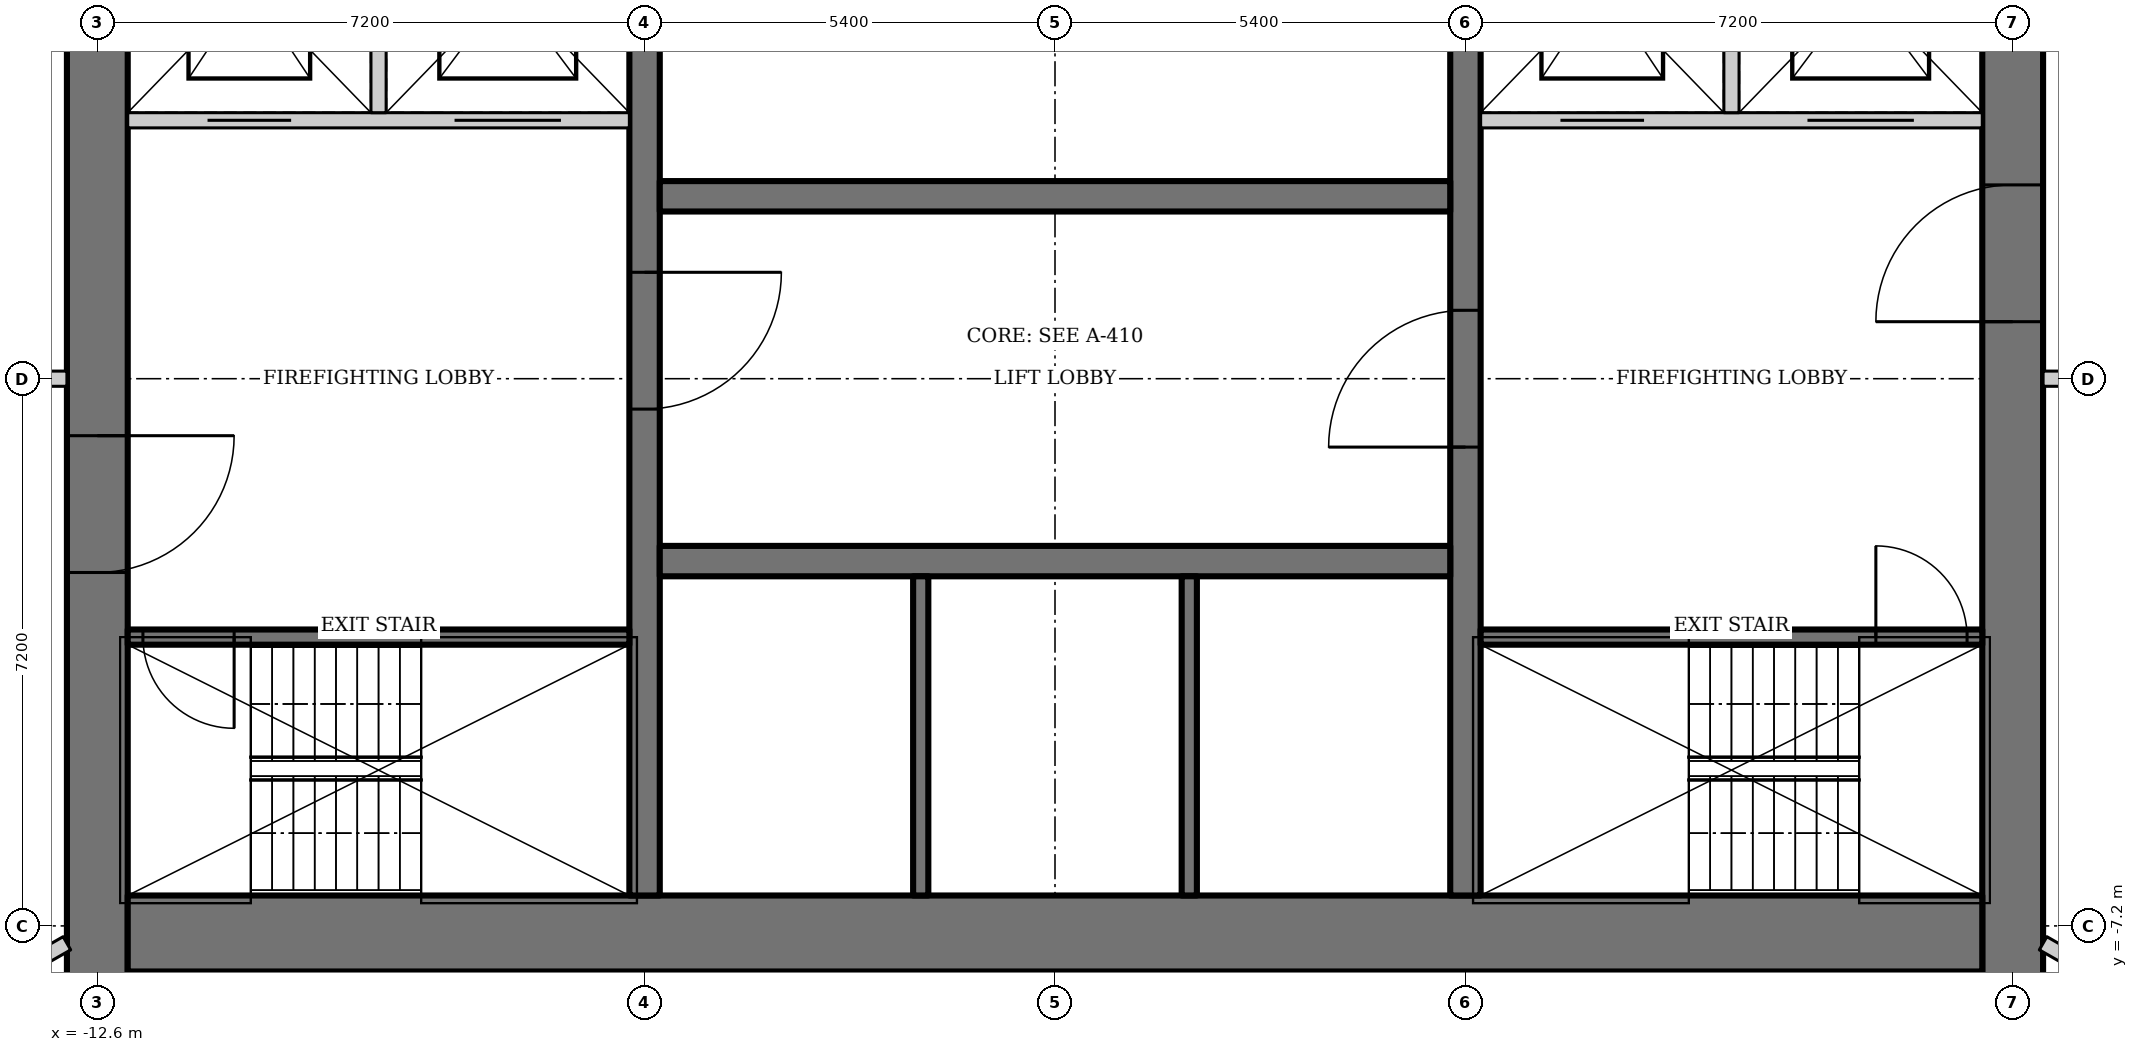
"""IFC4 building model, lengths in metres.
Left out: names, types, materials, properties, quantities, classifications, styles, units other than length and angle.
Written with IfcOpenShell. Run it as: python <this file> out.ifc"""

import sys

from ifc_helpers import new_model, si_unit, direction, frame, frame_2d, origin, place, context, subcontext, project, spatial, rectangle, extrude, element, fill, save


model = new_model("IFC4")
c1 = context("Model", 3, precision=1e-05, world=origin(), true_north=direction((0.0, 1.0)))
c2 = subcontext(c1, "Body", "Model", "MODEL_VIEW")
j1 = project(units=[si_unit("LENGTHUNIT", "METRE"), si_unit("PLANEANGLEUNIT", "RADIAN")], contexts=[c1])
p1 = place(None, origin())
s1 = spatial("IfcSite", under=j1, at=p1, CompositionType="ELEMENT")
p2 = place(p1, origin())
s2 = spatial("IfcBuilding", under=s1, at=p2, CompositionType="ELEMENT")
p3 = place(p2, frame((0.0, 0.0, 284.4)))
s3 = spatial("IfcBuildingStorey", under=s2, at=p3, CompositionType="ELEMENT", Elevation=284.4)
p4 = place(p3, frame((12.6, -11.0, 0.0), z_axis=(0.0, 0.0, 1.0), x_axis=(0.0, 1.0, 0.0)))
e1 = element("IfcWall", 1, at=p4, inside=s3, PredefinedType="SHEAR", context=c2, shape_type="SweptSolid", body=[
    extrude(rectangle(XDim=22.0, YDim=0.8, at=frame_2d((11.0, 0.0))), origin(), (0.0, 0.0, 1.0), 6.0),
])
p5 = place(p4, frame((11.75, 0.0, 0.0)))
e2 = element("IfcOpeningElement", 2, at=p5, cuts=e1, PredefinedType="OPENING", context=c2, shape_type="SweptSolid", body=[
    extrude(rectangle(XDim=1.8, YDim=2.1, at=frame_2d((0.9, 1.05))), frame((0.0, 0.41, 0.0), z_axis=(0.0, -1.0, 0.0), x_axis=(1.0, 0.0, 0.0)), (0.0, 0.0, 1.0), 0.82),
])
p6 = place(p3, frame((-12.6, 11.0, 0.0), z_axis=(0.0, 0.0, 1.0), x_axis=(0.0, -1.0, 0.0)))
e3 = element("IfcWall", 3, at=p6, inside=s3, PredefinedType="SHEAR", context=c2, shape_type="SweptSolid", body=[
    extrude(rectangle(XDim=22.0, YDim=0.8, at=frame_2d((11.0, 0.0))), origin(), (0.0, 0.0, 1.0), 6.0),
])
p7 = place(p6, frame((11.75, 0.0, 0.0)))
e4 = element("IfcOpeningElement", 4, at=p7, cuts=e3, PredefinedType="OPENING", context=c2, shape_type="SweptSolid", body=[
    extrude(rectangle(XDim=1.8, YDim=2.1, at=frame_2d((0.9, 1.05))), frame((0.0, 0.41, 0.0), z_axis=(0.0, -1.0, 0.0), x_axis=(1.0, 0.0, 0.0)), (0.0, 0.0, 1.0), 0.82),
])
p8 = place(p3, frame((-12.2, -7.3, 0.0), z_axis=(0.0, 0.0, 1.0), x_axis=(1.0, 0.0, 0.0)))
e5 = element("IfcWall", 5, at=p8, inside=s3, PredefinedType="SHEAR", context=c2, shape_type="SweptSolid", body=[
    extrude(rectangle(XDim=24.4, YDim=1.0, at=frame_2d((12.2, 0.0))), origin(), (0.0, 0.0, 1.0), 6.0),
])
p9 = place(p3, frame((5.4, -6.8, 0.0), z_axis=(0.0, 0.0, 1.0), x_axis=(0.0, 1.0, 0.0)))
e6 = element("IfcWall", 6, at=p9, inside=s3, PredefinedType="SHEAR", context=c2, shape_type="SweptSolid", body=[
    extrude(rectangle(XDim=14.6, YDim=0.4, at=frame_2d((7.3, 0.0))), origin(), (0.0, 0.0, 1.0), 6.0),
])
p10 = place(p9, frame((5.9, 0.0, 0.0)))
e7 = element("IfcOpeningElement", 7, at=p10, cuts=e6, PredefinedType="OPENING", context=c2, shape_type="SweptSolid", body=[
    extrude(rectangle(XDim=1.8, YDim=2.1, at=frame_2d((0.9, 1.05))), frame((0.0, 0.21, 0.0), z_axis=(0.0, -1.0, 0.0), x_axis=(1.0, 0.0, 0.0)), (0.0, 0.0, 1.0), 0.42),
])
p11 = place(p3, frame((-5.4, 7.8, 0.0), z_axis=(0.0, 0.0, 1.0), x_axis=(0.0, -1.0, 0.0)))
e8 = element("IfcWall", 8, at=p11, inside=s3, PredefinedType="SHEAR", context=c2, shape_type="SweptSolid", body=[
    extrude(rectangle(XDim=14.6, YDim=0.4, at=frame_2d((7.3, 0.0))), origin(), (0.0, 0.0, 1.0), 6.0),
])
p12 = place(p11, frame((6.4, 0.0, 0.0)))
e9 = element("IfcOpeningElement", 9, at=p12, cuts=e8, PredefinedType="OPENING", context=c2, shape_type="SweptSolid", body=[
    extrude(rectangle(XDim=1.8, YDim=2.1, at=frame_2d((0.9, 1.05))), frame((0.0, 0.21, 0.0), z_axis=(0.0, -1.0, 0.0), x_axis=(1.0, 0.0, 0.0)), (0.0, 0.0, 1.0), 0.42),
])
p13 = place(p3, frame((-5.2, -2.4, 0.0), z_axis=(0.0, 0.0, 1.0), x_axis=(1.0, 0.0, 0.0)))
e10 = element("IfcWall", 10, at=p13, inside=s3, PredefinedType="SHEAR", context=c2, shape_type="SweptSolid", body=[
    extrude(rectangle(XDim=10.4, YDim=0.4, at=frame_2d((5.2, 0.0))), origin(), (0.0, 0.0, 1.0), 6.0),
])
for number, where, z_axis, x_axis in (
    (11, (-1.767, -2.6, 0.0), (0.0, 0.0, 1.0), (0.0, -1.0, 0.0)),
    (12, (1.767, -2.6, 0.0), (0.0, 0.0, 1.0), (0.0, -1.0, 0.0)),
):
    element("IfcWall", number, at=place(p3, frame(where, z_axis=z_axis, x_axis=x_axis)), inside=s3, PredefinedType="SOLIDWALL", context=c2, shape_type="SweptSolid", body=[
        extrude(rectangle(XDim=4.2, YDim=0.2, at=frame_2d((2.1, 0.0))), origin(), (0.0, 0.0, 1.0), 6.0),
    ])
p14 = place(p3, frame((5.2, 2.4, 0.0), z_axis=(0.0, 0.0, 1.0), x_axis=(-1.0, 0.0, 0.0)))
e13 = element("IfcWall", 13, at=p14, inside=s3, PredefinedType="SHEAR", context=c2, shape_type="SweptSolid", body=[
    extrude(rectangle(XDim=10.4, YDim=0.4, at=frame_2d((5.2, 0.0))), origin(), (0.0, 0.0, 1.0), 6.0),
])
p15 = place(p3, frame((5.6, -3.4, 0.0), z_axis=(0.0, 0.0, 1.0), x_axis=(1.0, 0.0, 0.0)))
e14 = element("IfcWall", 14, at=p15, inside=s3, PredefinedType="SHEAR", context=c2, shape_type="SweptSolid", body=[
    extrude(rectangle(XDim=6.6, YDim=0.2, at=frame_2d((3.3, 0.0))), origin(), (0.0, 0.0, 1.0), 6.0),
])
p16 = place(p15, frame((5.2, 0.0, 0.0)))
e15 = element("IfcOpeningElement", 15, at=p16, cuts=e14, PredefinedType="OPENING", context=c2, shape_type="SweptSolid", body=[
    extrude(rectangle(XDim=1.2, YDim=2.1, at=frame_2d((0.6, 1.05))), frame((0.0, 0.11, 0.0), z_axis=(0.0, -1.0, 0.0), x_axis=(1.0, 0.0, 0.0)), (0.0, 0.0, 1.0), 0.22),
])
p17 = place(p3, frame((12.2, 3.4, 0.0), z_axis=(0.0, 0.0, 1.0), x_axis=(-1.0, 0.0, 0.0)))
e16 = element("IfcWall", 16, at=p17, inside=s3, PredefinedType="SOLIDWALL", context=c2, shape_type="SweptSolid", body=[
    extrude(rectangle(XDim=6.6, YDim=0.2, at=frame_2d((3.3, 0.0))), origin(), (0.0, 0.0, 1.0), 6.0),
])
p18 = place(p17, frame((4.45, 0.0, 0.0)))
e17 = element("IfcOpeningElement", 17, at=p18, cuts=e16, PredefinedType="OPENING", context=c2, shape_type="SweptSolid", body=[
    extrude(rectangle(XDim=1.1, YDim=2.2, at=frame_2d((0.55, 1.1))), frame((0.0, 0.11, 0.0), z_axis=(0.0, -1.0, 0.0), x_axis=(1.0, 0.0, 0.0)), (0.0, 0.0, 1.0), 0.22),
])
p19 = place(p17, frame((0.9, 0.0, 0.0)))
e18 = element("IfcOpeningElement", 18, at=p19, cuts=e16, PredefinedType="OPENING", context=c2, shape_type="SweptSolid", body=[
    extrude(rectangle(XDim=1.4, YDim=2.2, at=frame_2d((0.7, 1.1))), frame((0.0, 0.11, 0.0), z_axis=(0.0, -1.0, 0.0), x_axis=(1.0, 0.0, 0.0)), (0.0, 0.0, 1.0), 0.22),
])
p20 = place(p3, frame((8.9, 3.5, 0.0), z_axis=(0.0, 0.0, 1.0), x_axis=(0.0, 1.0, 0.0)))
e19 = element("IfcWall", 19, at=p20, inside=s3, PredefinedType="SOLIDWALL", context=c2, shape_type="SweptSolid", body=[
    extrude(rectangle(XDim=3.3, YDim=0.2, at=frame_2d((1.65, 0.0))), origin(), (0.0, 0.0, 1.0), 6.0),
])
p21 = place(p3, frame((-5.6, -3.4, 0.0), z_axis=(0.0, 0.0, 1.0), x_axis=(-1.0, 0.0, 0.0)))
e20 = element("IfcWall", 20, at=p21, inside=s3, PredefinedType="SHEAR", context=c2, shape_type="SweptSolid", body=[
    extrude(rectangle(XDim=6.6, YDim=0.2, at=frame_2d((3.3, 0.0))), origin(), (0.0, 0.0, 1.0), 6.0),
])
p22 = place(p21, frame((5.2, 0.0, 0.0)))
e21 = element("IfcOpeningElement", 21, at=p22, cuts=e20, PredefinedType="OPENING", context=c2, shape_type="SweptSolid", body=[
    extrude(rectangle(XDim=1.2, YDim=2.1, at=frame_2d((0.6, 1.05))), frame((0.0, 0.11, 0.0), z_axis=(0.0, -1.0, 0.0), x_axis=(1.0, 0.0, 0.0)), (0.0, 0.0, 1.0), 0.22),
])
p23 = place(p3, frame((-12.2, 3.4, 0.0), z_axis=(0.0, 0.0, 1.0), x_axis=(1.0, 0.0, 0.0)))
e22 = element("IfcWall", 22, at=p23, inside=s3, PredefinedType="SOLIDWALL", context=c2, shape_type="SweptSolid", body=[
    extrude(rectangle(XDim=6.6, YDim=0.2, at=frame_2d((3.3, 0.0))), origin(), (0.0, 0.0, 1.0), 6.0),
])
p24 = place(p23, frame((1.05, 0.0, 0.0)))
e23 = element("IfcOpeningElement", 23, at=p24, cuts=e22, PredefinedType="OPENING", context=c2, shape_type="SweptSolid", body=[
    extrude(rectangle(XDim=1.1, YDim=2.2, at=frame_2d((0.55, 1.1))), frame((0.0, 0.11, 0.0), z_axis=(0.0, -1.0, 0.0), x_axis=(1.0, 0.0, 0.0)), (0.0, 0.0, 1.0), 0.22),
])
p25 = place(p23, frame((4.3, 0.0, 0.0)))
e24 = element("IfcOpeningElement", 24, at=p25, cuts=e22, PredefinedType="OPENING", context=c2, shape_type="SweptSolid", body=[
    extrude(rectangle(XDim=1.4, YDim=2.2, at=frame_2d((0.7, 1.1))), frame((0.0, 0.11, 0.0), z_axis=(0.0, -1.0, 0.0), x_axis=(1.0, 0.0, 0.0)), (0.0, 0.0, 1.0), 0.22),
])
p26 = place(p3, frame((-8.9, 3.5, 0.0), z_axis=(0.0, 0.0, 1.0), x_axis=(0.0, 1.0, 0.0)))
e25 = element("IfcWall", 25, at=p26, inside=s3, PredefinedType="SOLIDWALL", context=c2, shape_type="SweptSolid", body=[
    extrude(rectangle(XDim=3.3, YDim=0.2, at=frame_2d((1.65, 0.0))), origin(), (0.0, 0.0, 1.0), 6.0),
])
for number, where, z_axis, x_axis in (
    (26, (13.0, 0.0, 0.0), (0.0, 0.0, 1.0), (1.0, 0.0, 0.0)),
    (27, (-13.0, 0.0, 0.0), (0.0, 0.0, 1.0), (-1.0, 0.0, 0.0)),
):
    element("IfcWall", number, at=place(p3, frame(where, z_axis=z_axis, x_axis=x_axis)), inside=s3, PredefinedType="SOLIDWALL", context=c2, shape_type="SweptSolid", body=[
        extrude(rectangle(XDim=4.5, YDim=0.2, at=frame_2d((2.25, 0.0))), origin(), (0.0, 0.0, 1.0), 4.6),
    ])
for number, where, z_axis, x_axis in (
    (28, (-13.0, -7.428, 0.0), (0.0, 0.0, 1.0), (-0.868, -0.496, 0.0)),
    (29, (13.0, -7.428, 0.0), (0.0, 0.0, 1.0), (0.868, -0.496, 0.0)),
):
    element("IfcWall", number, at=place(p3, frame(where, z_axis=z_axis, x_axis=x_axis)), inside=s3, PredefinedType="SOLIDWALL", context=c2, shape_type="SweptSolid", body=[
        extrude(rectangle(XDim=3.167, YDim=0.2, at=frame_2d((1.584, 0.0))), origin(), (0.0, 0.0, 1.0), 4.6),
    ])
p27 = place(p10, origin())
e30 = element("IfcDoor", 30, at=p27, inside=s3, OperationType="DOUBLE_DOOR_DOUBLE_SWING", PredefinedType="DOOR", context=c2, shape_type="SweptSolid", body=[
    extrude(rectangle(XDim=1.8, YDim=2.1, at=frame_2d((0.9, 1.05))), frame((0.0, 0.025, 0.0), z_axis=(0.0, -1.0, 0.0), x_axis=(1.0, 0.0, 0.0)), (0.0, 0.0, 1.0), 0.05),
])
fill(e7, e30)
p28 = place(p12, origin())
e31 = element("IfcDoor", 31, at=p28, inside=s3, OperationType="DOUBLE_DOOR_DOUBLE_SWING", PredefinedType="DOOR", context=c2, shape_type="SweptSolid", body=[
    extrude(rectangle(XDim=1.8, YDim=2.1, at=frame_2d((0.9, 1.05))), frame((0.0, 0.025, 0.0), z_axis=(0.0, -1.0, 0.0), x_axis=(1.0, 0.0, 0.0)), (0.0, 0.0, 1.0), 0.05),
])
fill(e9, e31)
p29 = place(p16, origin())
e32 = element("IfcDoor", 32, at=p29, inside=s3, OperationType="SINGLE_SWING_RIGHT", PredefinedType="DOOR", context=c2, shape_type="SweptSolid", body=[
    extrude(rectangle(XDim=1.2, YDim=2.1, at=frame_2d((0.6, 1.05))), frame((0.0, 0.025, 0.0), z_axis=(0.0, -1.0, 0.0), x_axis=(1.0, 0.0, 0.0)), (0.0, 0.0, 1.0), 0.05),
])
fill(e15, e32)
p30 = place(p22, origin())
e33 = element("IfcDoor", 33, at=p30, inside=s3, OperationType="SINGLE_SWING_RIGHT", PredefinedType="DOOR", context=c2, shape_type="SweptSolid", body=[
    extrude(rectangle(XDim=1.2, YDim=2.1, at=frame_2d((0.6, 1.05))), frame((0.0, 0.025, 0.0), z_axis=(0.0, -1.0, 0.0), x_axis=(1.0, 0.0, 0.0)), (0.0, 0.0, 1.0), 0.05),
])
fill(e21, e33)
p31 = place(p5, origin())
e34 = element("IfcDoor", 34, at=p31, inside=s3, OperationType="DOUBLE_DOOR_DOUBLE_SWING", PredefinedType="DOOR", context=c2, shape_type="SweptSolid", body=[
    extrude(rectangle(XDim=1.8, YDim=2.1, at=frame_2d((0.9, 1.05))), frame((0.0, 0.025, 0.0), z_axis=(0.0, -1.0, 0.0), x_axis=(1.0, 0.0, 0.0)), (0.0, 0.0, 1.0), 0.05),
])
fill(e2, e34)
p32 = place(p7, origin())
e35 = element("IfcDoor", 35, at=p32, inside=s3, OperationType="DOUBLE_DOOR_DOUBLE_SWING", PredefinedType="DOOR", context=c2, shape_type="SweptSolid", body=[
    extrude(rectangle(XDim=1.8, YDim=2.1, at=frame_2d((0.9, 1.05))), frame((0.0, 0.025, 0.0), z_axis=(0.0, -1.0, 0.0), x_axis=(1.0, 0.0, 0.0)), (0.0, 0.0, 1.0), 0.05),
])
fill(e4, e35)
p33 = place(p24, origin())
e36 = element("IfcDoor", 36, at=p33, inside=s3, OperationType="DOUBLE_DOOR_SLIDING", PredefinedType="DOOR", context=c2, shape_type="SweptSolid", body=[
    extrude(rectangle(XDim=1.1, YDim=2.2, at=frame_2d((0.55, 1.1))), frame((0.0, 0.025, 0.0), z_axis=(0.0, -1.0, 0.0), x_axis=(1.0, 0.0, 0.0)), (0.0, 0.0, 1.0), 0.05),
])
fill(e23, e36)
p34 = place(p25, origin())
e37 = element("IfcDoor", 37, at=p34, inside=s3, OperationType="DOUBLE_DOOR_SLIDING", PredefinedType="DOOR", context=c2, shape_type="SweptSolid", body=[
    extrude(rectangle(XDim=1.4, YDim=2.2, at=frame_2d((0.7, 1.1))), frame((0.0, 0.025, 0.0), z_axis=(0.0, -1.0, 0.0), x_axis=(1.0, 0.0, 0.0)), (0.0, 0.0, 1.0), 0.05),
])
fill(e24, e37)
p35 = place(p18, origin())
e38 = element("IfcDoor", 38, at=p35, inside=s3, OperationType="DOUBLE_DOOR_SLIDING", PredefinedType="DOOR", context=c2, shape_type="SweptSolid", body=[
    extrude(rectangle(XDim=1.1, YDim=2.2, at=frame_2d((0.55, 1.1))), frame((0.0, 0.025, 0.0), z_axis=(0.0, -1.0, 0.0), x_axis=(1.0, 0.0, 0.0)), (0.0, 0.0, 1.0), 0.05),
])
fill(e17, e38)
p36 = place(p19, origin())
e39 = element("IfcDoor", 39, at=p36, inside=s3, OperationType="DOUBLE_DOOR_SLIDING", PredefinedType="DOOR", context=c2, shape_type="SweptSolid", body=[
    extrude(rectangle(XDim=1.4, YDim=2.2, at=frame_2d((0.7, 1.1))), frame((0.0, 0.025, 0.0), z_axis=(0.0, -1.0, 0.0), x_axis=(1.0, 0.0, 0.0)), (0.0, 0.0, 1.0), 0.05),
])
fill(e18, e39)
save(model, sys.argv[1])
